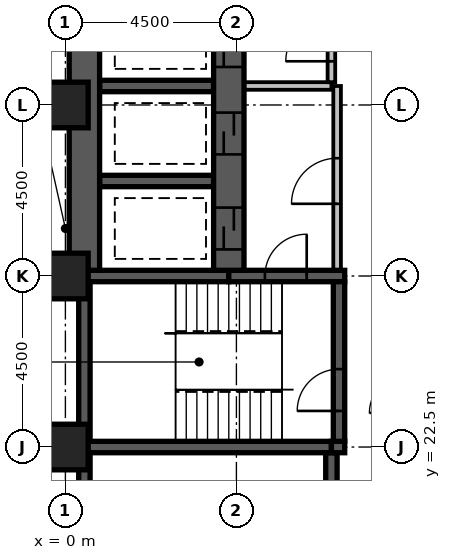
"""IFC4 building model, lengths in metres.
Left out: names, types, materials, properties, quantities, classifications, styles, units other than length and angle.
Written with IfcOpenShell. Run it as: python <this file> out.ifc"""

import sys

from ifc_helpers import new_model, si_unit, direction, frame, frame_2d, origin, origin_2d, place, context, subcontext, project, spatial, rectangle, extrude, element, fill, save


model = new_model("IFC4")
c1 = context("Model", 3, precision=1e-05, world=origin(), true_north=direction((0.0, 1.0)))
c2 = subcontext(c1, "Body", "Model", "MODEL_VIEW")
j1 = project(units=[si_unit("LENGTHUNIT", "METRE"), si_unit("PLANEANGLEUNIT", "RADIAN")], contexts=[c1])
p1 = place(None, origin())
s1 = spatial("IfcSite", under=j1, at=p1, CompositionType="ELEMENT")
p2 = place(p1, origin())
s2 = spatial("IfcBuilding", under=s1, at=p2, CompositionType="ELEMENT")
p3 = place(p2, frame((0.0, 0.0, 101.0)))
s3 = spatial("IfcBuildingStorey", under=s2, at=p3, CompositionType="ELEMENT", Elevation=101.0)
p4 = place(p3, frame((0.35, 22.5, -0.3), z_axis=(0.0, 0.0, 1.0), x_axis=(1.0, 0.0, 0.0)))
e1 = element("IfcWall", 1, at=p4, inside=s3, PredefinedType="SHEAR", context=c2, shape_type="SweptSolid", body=[
    extrude(rectangle(XDim=6.65, YDim=0.3, at=frame_2d((3.325, 0.0))), origin(), (0.0, 0.0, 1.0), 3.6),
])
p5 = place(p3, frame((0.35, 27.0, -0.3), z_axis=(0.0, 0.0, 1.0), x_axis=(1.0, 0.0, 0.0)))
e2 = element("IfcWall", 2, at=p5, inside=s3, PredefinedType="SHEAR", context=c2, shape_type="SweptSolid", body=[
    extrude(rectangle(XDim=3.95, YDim=0.3, at=frame_2d((1.975, 0.0))), origin(), (0.0, 0.0, 1.0), 3.6),
])
p6 = place(p3, frame((0.5, 18.65, -0.3), z_axis=(0.0, 0.0, 1.0), x_axis=(0.0, 1.0, 0.0)))
e3 = element("IfcWall", 3, at=p6, inside=s3, PredefinedType="SHEAR", context=c2, shape_type="SweptSolid", body=[
    extrude(rectangle(XDim=3.7, YDim=0.3, at=frame_2d((1.85, 0.0))), origin(), (0.0, 0.0, 1.0), 3.6),
])
p7 = place(p3, frame((0.5, 22.65, -0.3), z_axis=(0.0, 0.0, 1.0), x_axis=(0.0, 1.0, 0.0)))
e4 = element("IfcWall", 4, at=p7, inside=s3, PredefinedType="SHEAR", context=c2, shape_type="SweptSolid", body=[
    extrude(rectangle(XDim=4.2, YDim=0.3, at=frame_2d((2.1, 0.0))), origin(), (0.0, 0.0, 1.0), 3.6),
])
p8 = place(p3, frame((0.5, 27.15, -0.3), z_axis=(0.0, 0.0, 1.0), x_axis=(0.0, 1.0, 0.0)))
e5 = element("IfcWall", 5, at=p8, inside=s3, PredefinedType="SHEAR", context=c2, shape_type="SweptSolid", body=[
    extrude(rectangle(XDim=6.95, YDim=0.8, at=frame_2d((3.475, 0.0))), origin(), (0.0, 0.0, 1.0), 3.6),
])
for number, where, z_axis, x_axis in (
    (6, (0.9, 29.5, -0.3), (0.0, 0.0, 1.0), (1.0, 0.0, 0.0)),
    (7, (0.9, 32.0, -0.3), (0.0, 0.0, 1.0), (1.0, 0.0, 0.0)),
):
    element("IfcWall", number, at=place(p3, frame(where, z_axis=z_axis, x_axis=x_axis)), inside=s3, PredefinedType="SHEAR", context=c2, shape_type="SweptSolid", body=[
        extrude(rectangle(XDim=3.0, YDim=0.3, at=frame_2d((1.5, 0.0))), origin(), (0.0, 0.0, 1.0), 3.6),
    ])
p9 = place(p3, frame((4.3, 27.0, -0.3), z_axis=(0.0, 0.0, 1.0), x_axis=(1.0, 0.0, 0.0)))
e8 = element("IfcWall", 8, at=p9, inside=s3, PredefinedType="SHEAR", context=c2, shape_type="SweptSolid", body=[
    extrude(rectangle(XDim=3.05, YDim=0.3, at=frame_2d((1.525, 0.0))), origin(), (0.0, 0.0, 1.0), 3.6),
])
p10 = place(p9, frame((0.95, 0.0, 0.3)))
e9 = element("IfcOpeningElement", 9, at=p10, cuts=e8, PredefinedType="OPENING", context=c2, shape_type="SweptSolid", body=[
    extrude(rectangle(XDim=1.1, YDim=2.1, at=frame_2d((0.55, 1.05))), frame((0.0, 0.162, 0.0), z_axis=(0.0, -1.0, 0.0), x_axis=(1.0, 0.0, 0.0)), (0.0, 0.0, 1.0), 0.324),
])
p11 = place(p3, frame((4.3, 27.15, -0.3), z_axis=(0.0, 0.0, 1.0), x_axis=(0.0, 1.0, 0.0)))
e10 = element("IfcWall", 10, at=p11, inside=s3, PredefinedType="SHEAR", context=c2, shape_type="SweptSolid", body=[
    extrude(rectangle(XDim=6.95, YDim=0.8, at=frame_2d((3.475, 0.0))), origin(), (0.0, 0.0, 1.0), 3.6),
])
p12 = place(p11, frame((3.05, 0.0, 0.3)))
e11 = element("IfcOpeningElement", 11, at=p12, cuts=e10, PredefinedType="OPENING", context=c2, shape_type="SweptSolid", body=[
    extrude(rectangle(XDim=1.1, YDim=2.1, at=frame_2d((0.55, 1.05))), frame((0.0, 0.412, 0.0), z_axis=(0.0, -1.0, 0.0), x_axis=(1.0, 0.0, 0.0)), (0.0, 0.0, 1.0), 0.824),
])
p13 = place(p11, frame((0.55, 0.0, 0.3)))
e12 = element("IfcOpeningElement", 12, at=p13, cuts=e10, PredefinedType="OPENING", context=c2, shape_type="SweptSolid", body=[
    extrude(rectangle(XDim=1.1, YDim=2.1, at=frame_2d((0.55, 1.05))), frame((0.0, 0.412, 0.0), z_axis=(0.0, -1.0, 0.0), x_axis=(1.0, 0.0, 0.0)), (0.0, 0.0, 1.0), 0.824),
])
p14 = place(p11, frame((5.35, 0.0, 0.3)))
e13 = element("IfcOpeningElement", 13, at=p14, cuts=e10, PredefinedType="OPENING", context=c2, shape_type="SweptSolid", body=[
    extrude(rectangle(XDim=1.1, YDim=2.1, at=frame_2d((0.55, 1.05))), frame((0.0, 0.412, 0.0), z_axis=(0.0, -1.0, 0.0), x_axis=(1.0, 0.0, 0.0)), (0.0, 0.0, 1.0), 0.824),
])
p15 = place(p3, frame((7.0, 18.65, -0.3), z_axis=(0.0, 0.0, 1.0), x_axis=(0.0, 1.0, 0.0)))
e14 = element("IfcWall", 14, at=p15, inside=s3, PredefinedType="SHEAR", context=c2, shape_type="SweptSolid", body=[
    extrude(rectangle(XDim=3.7, YDim=0.3, at=frame_2d((1.85, 0.0))), origin(), (0.0, 0.0, 1.0), 3.6),
])
p16 = place(p15, frame((1.35, 0.0, 0.3)))
e15 = element("IfcOpeningElement", 15, at=p16, cuts=e14, PredefinedType="OPENING", context=c2, shape_type="SweptSolid", body=[
    extrude(rectangle(XDim=1.0, YDim=2.1, at=frame_2d((0.5, 1.05))), frame((0.0, 0.162, 0.0), z_axis=(0.0, -1.0, 0.0), x_axis=(1.0, 0.0, 0.0)), (0.0, 0.0, 1.0), 0.324),
])
p17 = place(p3, frame((7.0, 22.5, -0.3), z_axis=(0.0, 0.0, 1.0), x_axis=(1.0, 0.0, 0.0)))
e16 = element("IfcWall", 16, at=p17, inside=s3, PredefinedType="SHEAR", context=c2, shape_type="SweptSolid", body=[
    extrude(rectangle(XDim=0.35, YDim=0.3, at=frame_2d((0.175, 0.0))), origin(), (0.0, 0.0, 1.0), 3.6),
])
p18 = place(p3, frame((7.2, 22.65, -0.3), z_axis=(0.0, 0.0, 1.0), x_axis=(0.0, 1.0, 0.0)))
e17 = element("IfcWall", 17, at=p18, inside=s3, PredefinedType="SHEAR", context=c2, shape_type="SweptSolid", body=[
    extrude(rectangle(XDim=4.2, YDim=0.3, at=frame_2d((2.1, 0.0))), origin(), (0.0, 0.0, 1.0), 3.6),
])
p19 = place(p18, frame((0.8, 0.0, 0.3)))
e18 = element("IfcOpeningElement", 18, at=p19, cuts=e17, PredefinedType="OPENING", context=c2, shape_type="SweptSolid", body=[
    extrude(rectangle(XDim=1.1, YDim=2.1, at=frame_2d((0.55, 1.05))), frame((0.0, 0.162, 0.0), z_axis=(0.0, -1.0, 0.0), x_axis=(1.0, 0.0, 0.0)), (0.0, 0.0, 1.0), 0.324),
])
for number, where, z_axis, x_axis in (
    (19, (0.0, 22.5, -0.3), (0.0, 0.0, 1.0), (1.0, 0.0, 0.0)),
    (20, (0.0, 27.0, -0.3), (0.0, 0.0, 1.0), (1.0, 0.0, 0.0)),
    (21, (0.0, 31.5, -0.3), (0.0, 0.0, 1.0), (1.0, 0.0, 0.0)),
):
    element("IfcColumn", number, at=place(p3, frame(where, z_axis=z_axis, x_axis=x_axis)), inside=s3, PredefinedType="COLUMN", context=c2, shape_type="SweptSolid", body=[
        extrude(rectangle(XDim=1.2, YDim=1.2, at=origin_2d()), origin(), (0.0, 0.0, 1.0), 3.6),
    ])
p20 = place(p3, frame((4.72, 32.0, 0.0), z_axis=(0.0, 0.0, 1.0), x_axis=(1.0, 0.0, 0.0)))
e22 = element("IfcWall", 22, at=p20, inside=s3, PredefinedType="PARTITIONING", context=c2, shape_type="SweptSolid", body=[
    extrude(rectangle(XDim=2.28, YDim=0.2, at=frame_2d((1.14, 0.0))), origin(), (0.0, 0.0, 1.0), 3.3),
])
p21 = place(p3, frame((7.0, 32.1, 0.0), z_axis=(0.0, 0.0, 1.0), x_axis=(0.0, 1.0, 0.0)))
e23 = element("IfcWall", 23, at=p21, inside=s3, PredefinedType="PARTITIONING", context=c2, shape_type="SweptSolid", body=[
    extrude(rectangle(XDim=2.4, YDim=0.2, at=frame_2d((1.2, 0.0))), origin(), (0.0, 0.0, 1.0), 3.3),
])
p22 = place(p21, frame((0.55, 0.0, 0.0)))
e24 = element("IfcOpeningElement", 24, at=p22, cuts=e23, PredefinedType="OPENING", context=c2, shape_type="SweptSolid", body=[
    extrude(rectangle(XDim=1.2, YDim=2.1, at=frame_2d((0.6, 1.05))), frame((0.0, 0.112, 0.0), z_axis=(0.0, -1.0, 0.0), x_axis=(1.0, 0.0, 0.0)), (0.0, 0.0, 1.0), 0.224),
])
p23 = place(p3, frame((7.15, 27.17, 0.0), z_axis=(0.0, 0.0, 1.0), x_axis=(0.0, 1.0, 0.0)))
e25 = element("IfcWall", 25, at=p23, inside=s3, PredefinedType="PARTITIONING", context=c2, shape_type="SweptSolid", body=[
    extrude(rectangle(XDim=4.83, YDim=0.2, at=frame_2d((2.415, 0.0))), origin(), (0.0, 0.0, 1.0), 3.3),
])
p24 = place(p23, frame((1.73, 0.0, 0.0)))
e26 = element("IfcOpeningElement", 26, at=p24, cuts=e25, PredefinedType="OPENING", context=c2, shape_type="SweptSolid", body=[
    extrude(rectangle(XDim=1.2, YDim=2.1, at=frame_2d((0.6, 1.05))), frame((0.0, 0.112, 0.0), z_axis=(0.0, -1.0, 0.0), x_axis=(1.0, 0.0, 0.0)), (0.0, 0.0, 1.0), 0.224),
])
p25 = place(p24, origin())
e27 = element("IfcDoor", 27, at=p25, inside=s3, OperationType="SINGLE_SWING_LEFT", PredefinedType="DOOR", context=c2, shape_type="SweptSolid", body=[
    extrude(rectangle(XDim=1.2, YDim=2.1, at=frame_2d((0.6, 1.05))), frame((0.0, 0.025, 0.0), z_axis=(0.0, -1.0, 0.0), x_axis=(1.0, 0.0, 0.0)), (0.0, 0.0, 1.0), 0.05),
])
fill(e26, e27)
p26 = place(p12, origin())
e28 = element("IfcDoor", 28, at=p26, inside=s3, OperationType="SLIDING_TO_LEFT", PredefinedType="DOOR", context=c2, shape_type="SweptSolid", body=[
    extrude(rectangle(XDim=1.1, YDim=2.1, at=frame_2d((0.55, 1.05))), frame((0.0, 0.025, 0.0), z_axis=(0.0, -1.0, 0.0), x_axis=(1.0, 0.0, 0.0)), (0.0, 0.0, 1.0), 0.05),
])
fill(e11, e28)
p27 = place(p13, origin())
e29 = element("IfcDoor", 29, at=p27, inside=s3, OperationType="SLIDING_TO_LEFT", PredefinedType="DOOR", context=c2, shape_type="SweptSolid", body=[
    extrude(rectangle(XDim=1.1, YDim=2.1, at=frame_2d((0.55, 1.05))), frame((0.0, 0.025, 0.0), z_axis=(0.0, -1.0, 0.0), x_axis=(1.0, 0.0, 0.0)), (0.0, 0.0, 1.0), 0.05),
])
fill(e12, e29)
p28 = place(p22, origin())
e30 = element("IfcDoor", 30, at=p28, inside=s3, OperationType="SINGLE_SWING_LEFT", PredefinedType="DOOR", context=c2, shape_type="SweptSolid", body=[
    extrude(rectangle(XDim=1.2, YDim=2.1, at=frame_2d((0.6, 1.05))), frame((0.0, 0.025, 0.0), z_axis=(0.0, -1.0, 0.0), x_axis=(1.0, 0.0, 0.0)), (0.0, 0.0, 1.0), 0.05),
])
fill(e24, e30)
p29 = place(p14, origin())
e31 = element("IfcDoor", 31, at=p29, inside=s3, OperationType="SLIDING_TO_LEFT", PredefinedType="DOOR", context=c2, shape_type="SweptSolid", body=[
    extrude(rectangle(XDim=1.1, YDim=2.1, at=frame_2d((0.55, 1.05))), frame((0.0, 0.025, 0.0), z_axis=(0.0, -1.0, 0.0), x_axis=(1.0, 0.0, 0.0)), (0.0, 0.0, 1.0), 0.05),
])
fill(e13, e31)
p30 = place(p10, frame((1.1, 0.0, 0.0), z_axis=(0.0, 0.0, 1.0), x_axis=(-1.0, 0.0, 0.0)))
e32 = element("IfcDoor", 32, at=p30, inside=s3, OperationType="SINGLE_SWING_LEFT", PredefinedType="DOOR", context=c2, shape_type="SweptSolid", body=[
    extrude(rectangle(XDim=1.1, YDim=2.1, at=frame_2d((0.55, 1.05))), frame((0.0, 0.025, 0.0), z_axis=(0.0, -1.0, 0.0), x_axis=(1.0, 0.0, 0.0)), (0.0, 0.0, 1.0), 0.05),
])
fill(e9, e32)
p31 = place(p19, origin())
e33 = element("IfcDoor", 33, at=p31, inside=s3, OperationType="SINGLE_SWING_LEFT", PredefinedType="DOOR", context=c2, shape_type="SweptSolid", body=[
    extrude(rectangle(XDim=1.1, YDim=2.1, at=frame_2d((0.55, 1.05))), frame((0.0, 0.025, 0.0), z_axis=(0.0, -1.0, 0.0), x_axis=(1.0, 0.0, 0.0)), (0.0, 0.0, 1.0), 0.05),
])
fill(e18, e33)
save(model, sys.argv[1])
